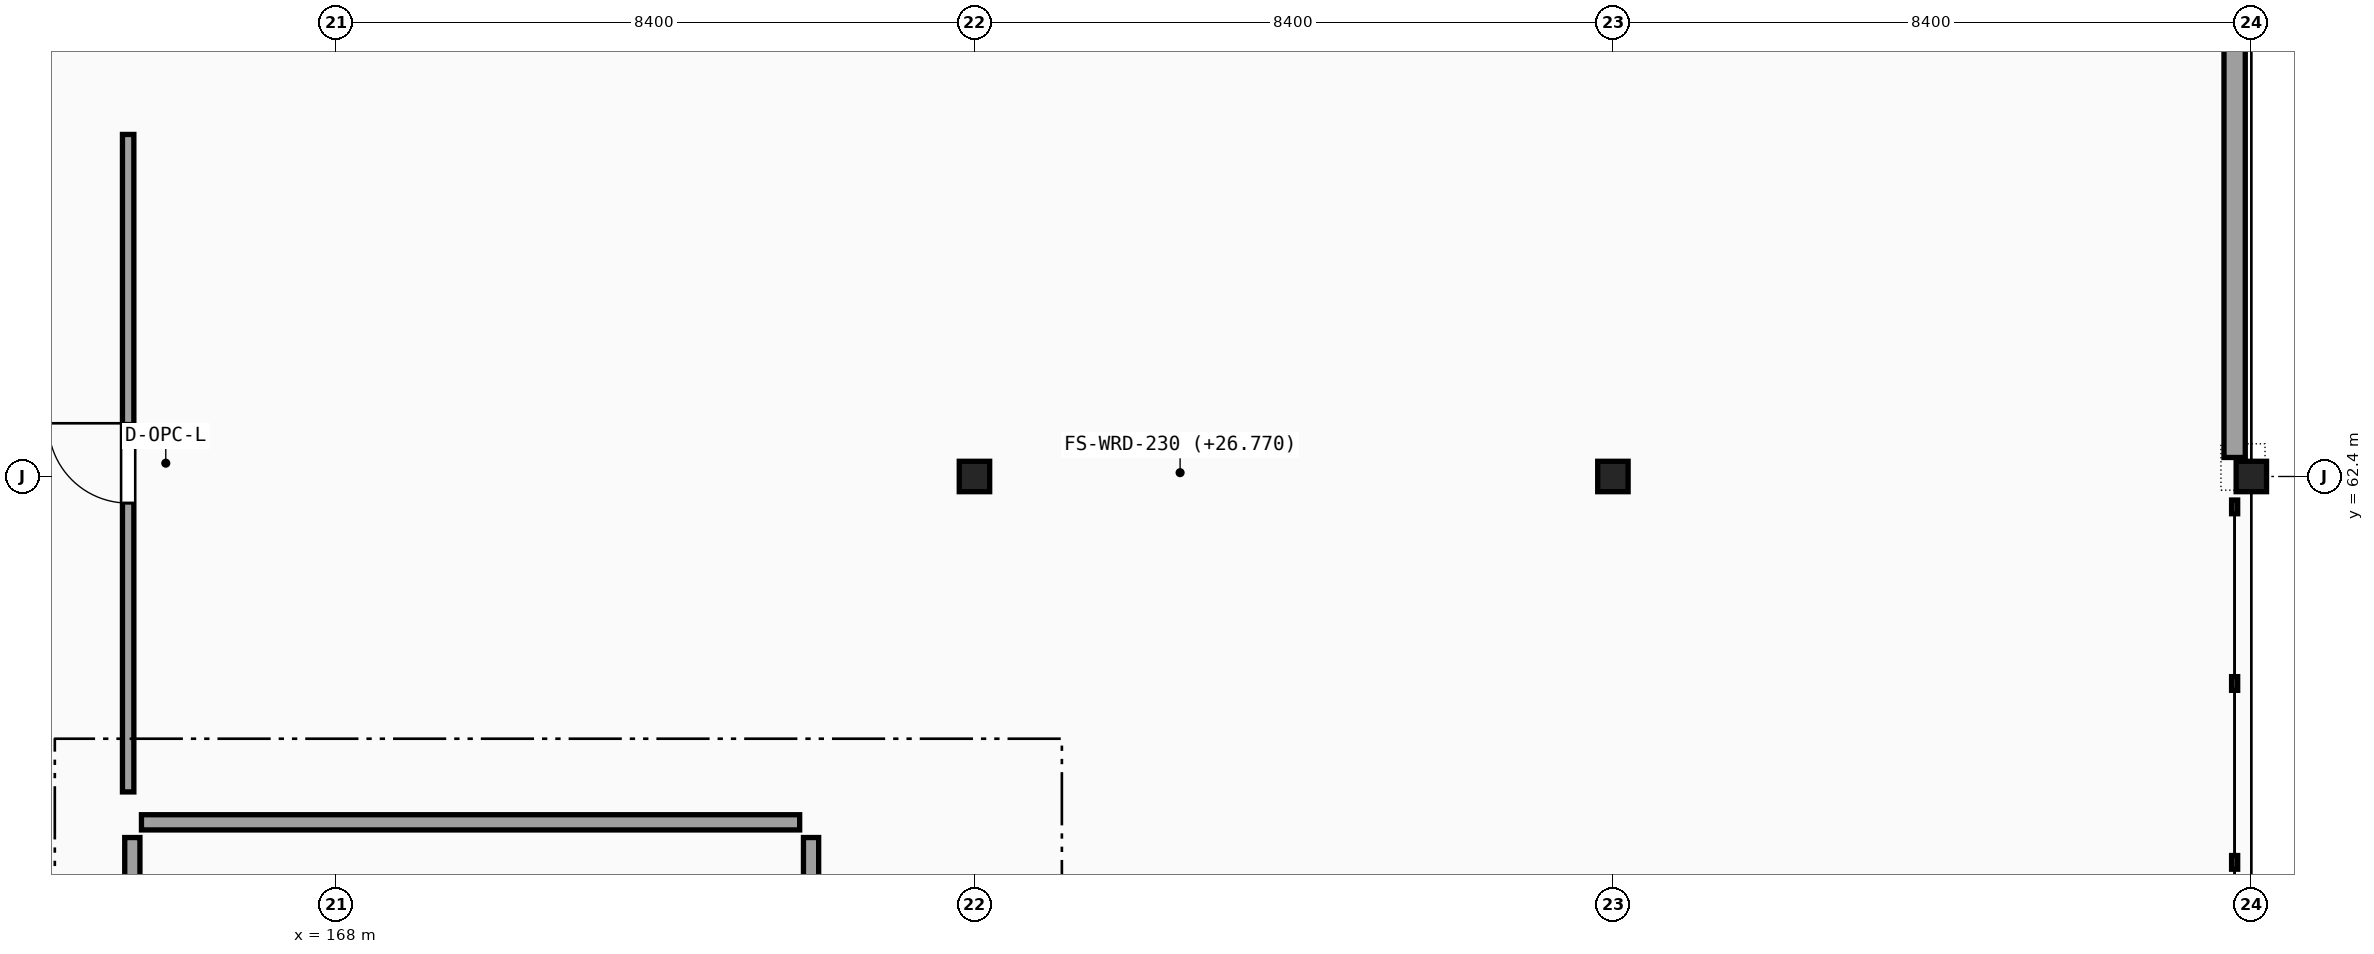
"""IFC4 building model, lengths in metres.
Left out: names, types, materials, properties, quantities, classifications, styles, units other than length and angle.
Written with IfcOpenShell. Run it as: python <this file> out.ifc"""

import sys

from ifc_helpers import new_model, si_unit, direction, frame, frame_2d, origin, origin_2d, place, context, subcontext, project, spatial, rectangle, i_section, extrude, element, fill, save


model = new_model("IFC4")
c1 = context("Model", 3, precision=1e-05, world=origin(), true_north=direction((0.0, 1.0)))
c2 = subcontext(c1, "Body", "Model", "MODEL_VIEW")
j1 = project(units=[si_unit("LENGTHUNIT", "METRE"), si_unit("PLANEANGLEUNIT", "RADIAN")], contexts=[c1])
p1 = place(None, origin())
s1 = spatial("IfcSite", under=j1, at=p1, CompositionType="ELEMENT")
p2 = place(p1, origin())
s2 = spatial("IfcBuilding", under=s1, at=p2, CompositionType="ELEMENT")
p3 = place(p2, frame((0.0, 0.0, 27.0)))
s3 = spatial("IfcBuildingStorey", under=s2, at=p3, CompositionType="ELEMENT", Elevation=27.0)
for number, where, z_axis, x_axis in (
    (1, (176.4, 62.4, 0.0), (0.0, 0.0, 1.0), (1.0, 0.0, 0.0)),
    (2, (184.8, 62.4, 0.0), (0.0, 0.0, 1.0), (1.0, 0.0, 0.0)),
    (3, (193.2, 62.4, 0.0), (0.0, 0.0, 1.0), (1.0, 0.0, 0.0)),
):
    element("IfcColumn", number, at=place(p3, frame(where, z_axis=z_axis, x_axis=x_axis)), inside=s3, PredefinedType="COLUMN", context=c2, shape_type="SweptSolid", body=[
        extrude(i_section(OverallWidth=0.3, OverallDepth=0.4, WebThickness=0.013, FlangeThickness=0.024, FilletRadius=0.027, at=origin_2d()), origin(), (0.0, 0.0, 1.0), 4.05),
    ])
p4 = place(p3, frame((192.98, 62.65, 0.0), z_axis=(0.0, 0.0, 1.0), x_axis=(0.0, 1.0, 0.0)))
e4 = element("IfcWall", 4, at=p4, inside=s3, PredefinedType="SOLIDWALL", context=c2, shape_type="SweptSolid", body=[
    extrude(rectangle(XDim=7.3, YDim=0.28, at=frame_2d((3.65, 0.0))), origin(), (0.0, 0.0, 1.0), 3.26),
])
p5 = place(p3, frame((165.44, 57.85, 0.0), z_axis=(0.0, 0.0, 1.0), x_axis=(1.0, 0.0, 0.0)))
e5 = element("IfcWall", 5, at=p5, inside=s3, PredefinedType="PARTITIONING", context=c2, shape_type="SweptSolid", body=[
    extrude(rectangle(XDim=8.66, YDim=0.2, at=frame_2d((4.33, 0.0))), origin(), (0.0, 0.0, 1.0), 3.26),
])
p6 = place(p3, frame((165.32, 55.0, 0.0), z_axis=(0.0, 0.0, 1.0), x_axis=(0.0, 1.0, 0.0)))
e6 = element("IfcWall", 6, at=p6, inside=s3, PredefinedType="PARTITIONING", context=c2, shape_type="SweptSolid", body=[
    extrude(rectangle(XDim=2.65, YDim=0.2, at=frame_2d((1.325, 0.0))), origin(), (0.0, 0.0, 1.0), 3.26),
])
p7 = place(p6, frame((0.525, 0.0, 0.0)))
e7 = element("IfcOpeningElement", 7, at=p7, cuts=e6, PredefinedType="OPENING", context=c2, shape_type="SweptSolid", body=[
    extrude(rectangle(XDim=1.6, YDim=2.2, at=frame_2d((0.8, 1.1))), frame((0.0, 0.11, 0.0), z_axis=(0.0, -1.0, 0.0), x_axis=(1.0, 0.0, 0.0)), (0.0, 0.0, 1.0), 0.22),
])
p8 = place(p3, frame((174.25, 55.0, 0.0), z_axis=(0.0, 0.0, 1.0), x_axis=(0.0, 1.0, 0.0)))
e8 = element("IfcWall", 8, at=p8, inside=s3, PredefinedType="PARTITIONING", context=c2, shape_type="SweptSolid", body=[
    extrude(rectangle(XDim=2.65, YDim=0.2, at=frame_2d((1.325, 0.0))), origin(), (0.0, 0.0, 1.0), 3.26),
])
p9 = place(p8, frame((0.525, 0.0, 0.0)))
e9 = element("IfcOpeningElement", 9, at=p9, cuts=e8, PredefinedType="OPENING", context=c2, shape_type="SweptSolid", body=[
    extrude(rectangle(XDim=1.6, YDim=2.2, at=frame_2d((0.8, 1.1))), frame((0.0, 0.11, 0.0), z_axis=(0.0, -1.0, 0.0), x_axis=(1.0, 0.0, 0.0)), (0.0, 0.0, 1.0), 0.22),
])
p10 = place(p3, frame((165.265, 58.25, 0.0), z_axis=(0.0, 0.0, 1.0), x_axis=(0.0, 1.0, 0.0)))
e10 = element("IfcWall", 10, at=p10, inside=s3, PredefinedType="PARTITIONING", context=c2, shape_type="SweptSolid", body=[
    extrude(rectangle(XDim=8.65, YDim=0.15, at=frame_2d((4.325, 0.0))), origin(), (0.0, 0.0, 1.0), 3.26),
])
p11 = place(p10, frame((3.8, 0.0, 0.0)))
e11 = element("IfcOpeningElement", 11, at=p11, cuts=e10, PredefinedType="OPENING", context=c2, shape_type="SweptSolid", body=[
    extrude(rectangle(XDim=1.05, YDim=2.15, at=frame_2d((0.525, 1.075))), frame((0.0, 0.085, 0.0), z_axis=(0.0, -1.0, 0.0), x_axis=(1.0, 0.0, 0.0)), (0.0, 0.0, 1.0), 0.17),
])
p12 = place(p11, origin())
e12 = element("IfcDoor", 12, at=p12, inside=s3, OperationType="SINGLE_SWING_RIGHT", PredefinedType="DOOR", context=c2, shape_type="SweptSolid", body=[
    extrude(rectangle(XDim=1.05, YDim=2.15, at=frame_2d((0.525, 1.075))), frame((0.0, 0.025, 0.0), z_axis=(0.0, -1.0, 0.0), x_axis=(1.0, 0.0, 0.0)), (0.0, 0.0, 1.0), 0.05),
])
fill(e11, e12)
save(model, sys.argv[1])
